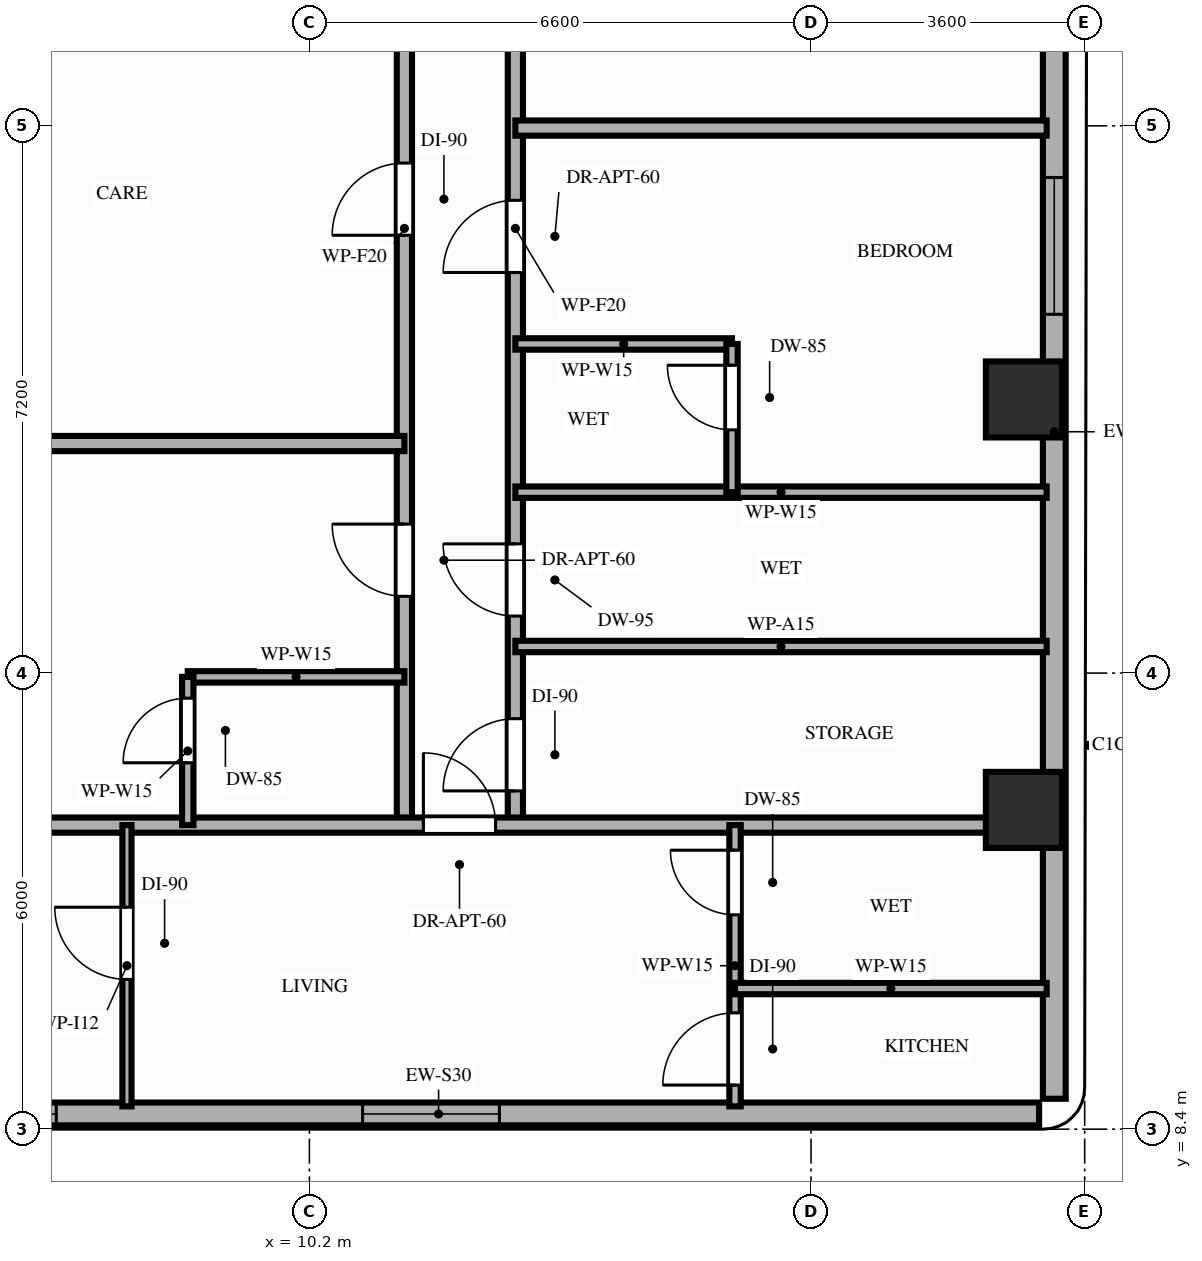
"""IFC4 building model, lengths in metres.
Left out: names, types, materials, properties, quantities, classifications, styles, units other than length and angle.
Written with IfcOpenShell. Run it as: python <this file> out.ifc"""

import sys

from ifc_helpers import new_model, si_unit, direction, frame, frame_2d, origin, origin_2d, place, context, subcontext, project, spatial, rectangle, extrude, element, fill, save


model = new_model("IFC4")
c1 = context("Model", 3, precision=1e-05, world=origin(), true_north=direction((0.0, 1.0)))
c2 = subcontext(c1, "Body", "Model", "MODEL_VIEW")
j1 = project(units=[si_unit("LENGTHUNIT", "METRE"), si_unit("PLANEANGLEUNIT", "RADIAN")], contexts=[c1])
p1 = place(None, origin())
s1 = spatial("IfcSite", under=j1, at=p1, CompositionType="ELEMENT")
p2 = place(p1, origin())
s2 = spatial("IfcBuilding", under=s1, at=p2, CompositionType="ELEMENT")
p3 = place(p2, frame((0.0, 0.0, 133.0)))
s3 = spatial("IfcBuildingStorey", under=s2, at=p3, CompositionType="ELEMENT", Elevation=133.0)
for number, where, z_axis, x_axis in (
    (1, (19.6, 12.6, 0.0), (0.0, 0.0, 1.0), (1.0, 0.0, 0.0)),
    (2, (19.6, 18.0, 0.0), (0.0, 0.0, 1.0), (1.0, 0.0, 0.0)),
):
    element("IfcColumn", number, at=place(p3, frame(where, z_axis=z_axis, x_axis=x_axis)), inside=s3, PredefinedType="COLUMN", context=c2, shape_type="SweptSolid", body=[
        extrude(rectangle(XDim=1.0, YDim=1.0, at=origin_2d()), origin(), (0.0, 0.0, 1.0), 3.2),
    ])
p4 = place(p3, frame((4.0, 8.6, 0.0), z_axis=(0.0, 0.0, 1.0), x_axis=(1.0, 0.0, 0.0)))
e3 = element("IfcWall", 3, at=p4, inside=s3, PredefinedType="STANDARD", context=c2, shape_type="SweptSolid", body=[
    extrude(rectangle(XDim=15.8, YDim=0.3, at=frame_2d((7.9, 0.0))), origin(), (0.0, 0.0, 1.0), 3.02),
])
p5 = place(p4, frame((1.07, 0.0, 0.85)))
e4 = element("IfcOpeningElement", 4, at=p5, cuts=e3, PredefinedType="OPENING", context=c2, shape_type="SweptSolid", body=[
    extrude(rectangle(XDim=1.8, YDim=1.75, at=frame_2d((0.9, 0.875))), frame((0.0, 0.16, 0.0), z_axis=(0.0, -1.0, 0.0), x_axis=(1.0, 0.0, 0.0)), (0.0, 0.0, 1.0), 0.32),
])
p6 = place(p4, frame((6.9, 0.0, 0.85)))
e5 = element("IfcOpeningElement", 5, at=p6, cuts=e3, PredefinedType="OPENING", context=c2, shape_type="SweptSolid", body=[
    extrude(rectangle(XDim=1.8, YDim=1.75, at=frame_2d((0.9, 0.875))), frame((0.0, 0.16, 0.0), z_axis=(0.0, -1.0, 0.0), x_axis=(1.0, 0.0, 0.0)), (0.0, 0.0, 1.0), 0.32),
])
p7 = place(p3, frame((20.0, 8.8, 0.0), z_axis=(0.0, 0.0, 1.0), x_axis=(0.0, 1.0, 0.0)))
e6 = element("IfcWall", 6, at=p7, inside=s3, PredefinedType="STANDARD", context=c2, shape_type="SweptSolid", body=[
    extrude(rectangle(XDim=17.55, YDim=0.3, at=frame_2d((8.775, 0.0))), origin(), (0.0, 0.0, 1.0), 2.46),
])
p8 = place(p7, frame((10.32, 0.0, 0.85)))
e7 = element("IfcOpeningElement", 7, at=p8, cuts=e6, PredefinedType="OPENING", context=c2, shape_type="SweptSolid", body=[
    extrude(rectangle(XDim=1.8, YDim=1.36, at=frame_2d((0.9, 0.68))), frame((0.0, 0.16, 0.0), z_axis=(0.0, -1.0, 0.0), x_axis=(1.0, 0.0, 0.0)), (0.0, 0.0, 1.0), 0.32),
])
p9 = place(p3, frame((11.45, 12.4, 0.0), z_axis=(0.0, 0.0, 1.0), x_axis=(0.0, 1.0, 0.0)))
e8 = element("IfcWall", 8, at=p9, inside=s3, PredefinedType="PARTITIONING", context=c2, shape_type="SweptSolid", body=[
    extrude(rectangle(XDim=15.7, YDim=0.2, at=frame_2d((7.85, 0.0))), origin(), (0.0, 0.0, 1.0), 2.46),
])
p10 = place(p9, frame((3.01, 0.0, 0.0)))
e9 = element("IfcOpeningElement", 9, at=p10, cuts=e8, PredefinedType="OPENING", context=c2, shape_type="SweptSolid", body=[
    extrude(rectangle(XDim=0.95, YDim=2.15, at=frame_2d((0.475, 1.075))), frame((0.0, 0.11, 0.0), z_axis=(0.0, -1.0, 0.0), x_axis=(1.0, 0.0, 0.0)), (0.0, 0.0, 1.0), 0.22),
])
p11 = place(p9, frame((7.76, 0.0, 0.0)))
e10 = element("IfcOpeningElement", 10, at=p11, cuts=e8, PredefinedType="OPENING", context=c2, shape_type="SweptSolid", body=[
    extrude(rectangle(XDim=0.95, YDim=2.15, at=frame_2d((0.475, 1.075))), frame((0.0, 0.11, 0.0), z_axis=(0.0, -1.0, 0.0), x_axis=(1.0, 0.0, 0.0)), (0.0, 0.0, 1.0), 0.22),
])
p12 = place(p9, frame((13.1, 0.0, 0.0)))
e11 = element("IfcOpeningElement", 11, at=p12, cuts=e8, PredefinedType="OPENING", context=c2, shape_type="SweptSolid", body=[
    extrude(rectangle(XDim=0.95, YDim=2.15, at=frame_2d((0.475, 1.075))), frame((0.0, 0.11, 0.0), z_axis=(0.0, -1.0, 0.0), x_axis=(1.0, 0.0, 0.0)), (0.0, 0.0, 1.0), 0.22),
])
p13 = place(p3, frame((12.91, 12.4, 0.0), z_axis=(0.0, 0.0, 1.0), x_axis=(0.0, 1.0, 0.0)))
e12 = element("IfcWall", 12, at=p13, inside=s3, PredefinedType="PARTITIONING", context=c2, shape_type="SweptSolid", body=[
    extrude(rectangle(XDim=15.7, YDim=0.2, at=frame_2d((7.85, 0.0))), origin(), (0.0, 0.0, 1.0), 2.46),
])
p14 = place(p13, frame((0.45, 0.0, 0.0)))
e13 = element("IfcOpeningElement", 13, at=p14, cuts=e12, PredefinedType="OPENING", context=c2, shape_type="SweptSolid", body=[
    extrude(rectangle(XDim=0.95, YDim=2.15, at=frame_2d((0.475, 1.075))), frame((0.0, 0.11, 0.0), z_axis=(0.0, -1.0, 0.0), x_axis=(1.0, 0.0, 0.0)), (0.0, 0.0, 1.0), 0.22),
])
p15 = place(p13, frame((2.75, 0.0, 0.0)))
e14 = element("IfcOpeningElement", 14, at=p15, cuts=e12, PredefinedType="OPENING", context=c2, shape_type="SweptSolid", body=[
    extrude(rectangle(XDim=0.95, YDim=2.1, at=frame_2d((0.475, 1.05))), frame((0.0, 0.11, 0.0), z_axis=(0.0, -1.0, 0.0), x_axis=(1.0, 0.0, 0.0)), (0.0, 0.0, 1.0), 0.22),
])
p16 = place(p13, frame((11.96, 0.0, 0.0)))
e15 = element("IfcOpeningElement", 15, at=p16, cuts=e12, PredefinedType="OPENING", context=c2, shape_type="SweptSolid", body=[
    extrude(rectangle(XDim=0.95, YDim=2.15, at=frame_2d((0.475, 1.075))), frame((0.0, 0.11, 0.0), z_axis=(0.0, -1.0, 0.0), x_axis=(1.0, 0.0, 0.0)), (0.0, 0.0, 1.0), 0.22),
])
p17 = place(p13, frame((7.27, 0.0, 0.0)))
e16 = element("IfcOpeningElement", 16, at=p17, cuts=e12, PredefinedType="OPENING", context=c2, shape_type="SweptSolid", body=[
    extrude(rectangle(XDim=0.95, YDim=2.15, at=frame_2d((0.475, 1.075))), frame((0.0, 0.11, 0.0), z_axis=(0.0, -1.0, 0.0), x_axis=(1.0, 0.0, 0.0)), (0.0, 0.0, 1.0), 0.22),
])
p18 = place(p3, frame((3.9, 12.4, 0.0), z_axis=(0.0, 0.0, 1.0), x_axis=(1.0, 0.0, 0.0)))
e17 = element("IfcWall", 17, at=p18, inside=s3, PredefinedType="PARTITIONING", context=c2, shape_type="SweptSolid", body=[
    extrude(rectangle(XDim=16.0, YDim=0.2, at=frame_2d((8.0, 0.0))), origin(), (0.0, 0.0, 1.0), 2.46),
])
p19 = place(p18, frame((7.8, 0.0, 0.0)))
e18 = element("IfcOpeningElement", 18, at=p19, cuts=e17, PredefinedType="OPENING", context=c2, shape_type="SweptSolid", body=[
    extrude(rectangle(XDim=0.95, YDim=2.15, at=frame_2d((0.475, 1.075))), frame((0.0, 0.11, 0.0), z_axis=(0.0, -1.0, 0.0), x_axis=(1.0, 0.0, 0.0)), (0.0, 0.0, 1.0), 0.22),
])
p20 = place(p3, frame((8.6, 14.35, 0.0), z_axis=(0.0, 0.0, 1.0), x_axis=(1.0, 0.0, 0.0)))
e19 = element("IfcWall", 19, at=p20, inside=s3, PredefinedType="PARTITIONING", context=c2, shape_type="SweptSolid", body=[
    extrude(rectangle(XDim=2.85, YDim=0.15, at=frame_2d((1.425, 0.0))), origin(), (0.0, 0.0, 1.0), 2.71),
])
p21 = place(p3, frame((8.6, 12.4, 0.0), z_axis=(0.0, 0.0, 1.0), x_axis=(0.0, 1.0, 0.0)))
e20 = element("IfcWall", 20, at=p21, inside=s3, PredefinedType="PARTITIONING", context=c2, shape_type="SweptSolid", body=[
    extrude(rectangle(XDim=1.95, YDim=0.15, at=frame_2d((0.975, 0.0))), origin(), (0.0, 0.0, 1.0), 2.46),
])
p22 = place(p21, frame((0.82, 0.0, 0.0)))
e21 = element("IfcOpeningElement", 21, at=p22, cuts=e20, PredefinedType="OPENING", context=c2, shape_type="SweptSolid", body=[
    extrude(rectangle(XDim=0.85, YDim=2.1, at=frame_2d((0.425, 1.05))), frame((0.0, 0.085, 0.0), z_axis=(0.0, -1.0, 0.0), x_axis=(1.0, 0.0, 0.0)), (0.0, 0.0, 1.0), 0.17),
])
p23 = place(p3, frame((3.9, 17.42, 0.0), z_axis=(0.0, 0.0, 1.0), x_axis=(1.0, 0.0, 0.0)))
e22 = element("IfcWall", 22, at=p23, inside=s3, PredefinedType="PARTITIONING", context=c2, shape_type="SweptSolid", body=[
    extrude(rectangle(XDim=7.55, YDim=0.2, at=frame_2d((3.775, 0.0))), origin(), (0.0, 0.0, 1.0), 2.46),
])
p24 = place(p3, frame((7.8, 8.7, 0.0), z_axis=(0.0, 0.0, 1.0), x_axis=(0.0, 1.0, 0.0)))
e23 = element("IfcWall", 23, at=p24, inside=s3, PredefinedType="PARTITIONING", context=c2, shape_type="SweptSolid", body=[
    extrude(rectangle(XDim=3.7, YDim=0.12, at=frame_2d((1.85, 0.0))), origin(), (0.0, 0.0, 1.0), 2.46),
])
p25 = place(p24, frame((1.67, 0.0, 0.0)))
e24 = element("IfcOpeningElement", 24, at=p25, cuts=e23, PredefinedType="OPENING", context=c2, shape_type="SweptSolid", body=[
    extrude(rectangle(XDim=0.95, YDim=2.15, at=frame_2d((0.475, 1.075))), frame((0.0, 0.07, 0.0), z_axis=(0.0, -1.0, 0.0), x_axis=(1.0, 0.0, 0.0)), (0.0, 0.0, 1.0), 0.14),
])
p26 = place(p3, frame((15.8, 8.7, 0.0), z_axis=(0.0, 0.0, 1.0), x_axis=(0.0, 1.0, 0.0)))
e25 = element("IfcWall", 25, at=p26, inside=s3, PredefinedType="PARTITIONING", context=c2, shape_type="SweptSolid", body=[
    extrude(rectangle(XDim=3.7, YDim=0.15, at=frame_2d((1.85, 0.0))), origin(), (0.0, 0.0, 1.0), 2.46),
])
p27 = place(p26, frame((0.28, 0.0, 0.0)))
e26 = element("IfcOpeningElement", 26, at=p27, cuts=e25, PredefinedType="OPENING", context=c2, shape_type="SweptSolid", body=[
    extrude(rectangle(XDim=0.95, YDim=2.15, at=frame_2d((0.475, 1.075))), frame((0.0, 0.085, 0.0), z_axis=(0.0, -1.0, 0.0), x_axis=(1.0, 0.0, 0.0)), (0.0, 0.0, 1.0), 0.17),
])
p28 = place(p26, frame((2.52, 0.0, 0.0)))
e27 = element("IfcOpeningElement", 27, at=p28, cuts=e25, PredefinedType="OPENING", context=c2, shape_type="SweptSolid", body=[
    extrude(rectangle(XDim=0.85, YDim=2.1, at=frame_2d((0.425, 1.05))), frame((0.0, 0.085, 0.0), z_axis=(0.0, -1.0, 0.0), x_axis=(1.0, 0.0, 0.0)), (0.0, 0.0, 1.0), 0.17),
])
p29 = place(p3, frame((15.8, 10.25, 0.0), z_axis=(0.0, 0.0, 1.0), x_axis=(1.0, 0.0, 0.0)))
e28 = element("IfcWall", 28, at=p29, inside=s3, PredefinedType="PARTITIONING", context=c2, shape_type="SweptSolid", body=[
    extrude(rectangle(XDim=4.1, YDim=0.15, at=frame_2d((2.05, 0.0))), origin(), (0.0, 0.0, 1.0), 3.02),
])
for number, where, z_axis, x_axis in (
    (29, (12.91, 14.75, 0.0), (0.0, 0.0, 1.0), (1.0, 0.0, 0.0)),
    (30, (12.91, 16.78, 0.0), (0.0, 0.0, 1.0), (1.0, 0.0, 0.0)),
):
    element("IfcWall", number, at=place(p3, frame(where, z_axis=z_axis, x_axis=x_axis)), inside=s3, PredefinedType="PARTITIONING", context=c2, shape_type="SweptSolid", body=[
        extrude(rectangle(XDim=6.99, YDim=0.15, at=frame_2d((3.495, 0.0))), origin(), (0.0, 0.0, 1.0), 2.46),
    ])
p30 = place(p3, frame((12.91, 21.57, 0.0), z_axis=(0.0, 0.0, 1.0), x_axis=(1.0, 0.0, 0.0)))
e31 = element("IfcWall", 31, at=p30, inside=s3, PredefinedType="PARTITIONING", context=c2, shape_type="SweptSolid", body=[
    extrude(rectangle(XDim=6.99, YDim=0.2, at=frame_2d((3.495, 0.0))), origin(), (0.0, 0.0, 1.0), 2.46),
])
p31 = place(p3, frame((12.91, 18.73, 0.0), z_axis=(0.0, 0.0, 1.0), x_axis=(1.0, 0.0, 0.0)))
e32 = element("IfcWall", 32, at=p31, inside=s3, PredefinedType="PARTITIONING", context=c2, shape_type="SweptSolid", body=[
    extrude(rectangle(XDim=2.85, YDim=0.15, at=frame_2d((1.425, 0.0))), origin(), (0.0, 0.0, 1.0), 3.02),
])
p32 = place(p3, frame((15.76, 16.78, 0.0), z_axis=(0.0, 0.0, 1.0), x_axis=(0.0, 1.0, 0.0)))
e33 = element("IfcWall", 33, at=p32, inside=s3, PredefinedType="PARTITIONING", context=c2, shape_type="SweptSolid", body=[
    extrude(rectangle(XDim=1.95, YDim=0.15, at=frame_2d((0.975, 0.0))), origin(), (0.0, 0.0, 1.0), 2.46),
])
p33 = place(p32, frame((0.82, 0.0, 0.0)))
e34 = element("IfcOpeningElement", 34, at=p33, cuts=e33, PredefinedType="OPENING", context=c2, shape_type="SweptSolid", body=[
    extrude(rectangle(XDim=0.85, YDim=2.1, at=frame_2d((0.425, 1.05))), frame((0.0, 0.085, 0.0), z_axis=(0.0, -1.0, 0.0), x_axis=(1.0, 0.0, 0.0)), (0.0, 0.0, 1.0), 0.17),
])
p34 = place(p5, origin())
e35 = element("IfcWindow", 35, at=p34, inside=s3, PartitioningType="SINGLE_PANEL", PredefinedType="WINDOW", context=c2, shape_type="SweptSolid", body=[
    extrude(rectangle(XDim=1.8, YDim=1.75, at=frame_2d((0.9, 0.875))), frame((0.0, 0.03, 0.0), z_axis=(0.0, -1.0, 0.0), x_axis=(1.0, 0.0, 0.0)), (0.0, 0.0, 1.0), 0.06),
])
fill(e4, e35)
p35 = place(p6, origin())
e36 = element("IfcWindow", 36, at=p35, inside=s3, PartitioningType="SINGLE_PANEL", PredefinedType="WINDOW", context=c2, shape_type="SweptSolid", body=[
    extrude(rectangle(XDim=1.8, YDim=1.75, at=frame_2d((0.9, 0.875))), frame((0.0, 0.03, 0.0), z_axis=(0.0, -1.0, 0.0), x_axis=(1.0, 0.0, 0.0)), (0.0, 0.0, 1.0), 0.06),
])
fill(e5, e36)
p36 = place(p8, origin())
e37 = element("IfcWindow", 37, at=p36, inside=s3, PartitioningType="SINGLE_PANEL", PredefinedType="WINDOW", context=c2, shape_type="SweptSolid", body=[
    extrude(rectangle(XDim=1.8, YDim=1.36, at=frame_2d((0.9, 0.68))), frame((0.0, 0.03, 0.0), z_axis=(0.0, -1.0, 0.0), x_axis=(1.0, 0.0, 0.0)), (0.0, 0.0, 1.0), 0.06),
])
fill(e7, e37)
p37 = place(p22, origin())
e38 = element("IfcDoor", 38, at=p37, inside=s3, OperationType="SINGLE_SWING_LEFT", PredefinedType="DOOR", context=c2, shape_type="SweptSolid", body=[
    extrude(rectangle(XDim=0.85, YDim=2.1, at=frame_2d((0.425, 1.05))), frame((0.0, 0.025, 0.0), z_axis=(0.0, -1.0, 0.0), x_axis=(1.0, 0.0, 0.0)), (0.0, 0.0, 1.0), 0.05),
])
fill(e21, e38)
p38 = place(p10, origin())
e39 = element("IfcDoor", 39, at=p38, inside=s3, OperationType="SINGLE_SWING_RIGHT", PredefinedType="DOOR", context=c2, shape_type="SweptSolid", body=[
    extrude(rectangle(XDim=0.95, YDim=2.15, at=frame_2d((0.475, 1.075))), frame((0.0, 0.025, 0.0), z_axis=(0.0, -1.0, 0.0), x_axis=(1.0, 0.0, 0.0)), (0.0, 0.0, 1.0), 0.05),
])
fill(e9, e39)
p39 = place(p11, origin())
e40 = element("IfcDoor", 40, at=p39, inside=s3, OperationType="SINGLE_SWING_LEFT", PredefinedType="DOOR", context=c2, shape_type="SweptSolid", body=[
    extrude(rectangle(XDim=0.95, YDim=2.15, at=frame_2d((0.475, 1.075))), frame((0.0, 0.025, 0.0), z_axis=(0.0, -1.0, 0.0), x_axis=(1.0, 0.0, 0.0)), (0.0, 0.0, 1.0), 0.05),
])
fill(e10, e40)
p40 = place(p19, origin())
e41 = element("IfcDoor", 41, at=p40, inside=s3, OperationType="SINGLE_SWING_LEFT", PredefinedType="DOOR", context=c2, shape_type="SweptSolid", body=[
    extrude(rectangle(XDim=0.95, YDim=2.15, at=frame_2d((0.475, 1.075))), frame((0.0, 0.025, 0.0), z_axis=(0.0, -1.0, 0.0), x_axis=(1.0, 0.0, 0.0)), (0.0, 0.0, 1.0), 0.05),
])
fill(e18, e41)
p41 = place(p25, origin())
e42 = element("IfcDoor", 42, at=p41, inside=s3, OperationType="SINGLE_SWING_RIGHT", PredefinedType="DOOR", context=c2, shape_type="SweptSolid", body=[
    extrude(rectangle(XDim=0.95, YDim=2.15, at=frame_2d((0.475, 1.075))), frame((0.0, 0.025, 0.0), z_axis=(0.0, -1.0, 0.0), x_axis=(1.0, 0.0, 0.0)), (0.0, 0.0, 1.0), 0.05),
])
fill(e24, e42)
p42 = place(p27, origin())
e43 = element("IfcDoor", 43, at=p42, inside=s3, OperationType="SINGLE_SWING_LEFT", PredefinedType="DOOR", context=c2, shape_type="SweptSolid", body=[
    extrude(rectangle(XDim=0.95, YDim=2.15, at=frame_2d((0.475, 1.075))), frame((0.0, 0.025, 0.0), z_axis=(0.0, -1.0, 0.0), x_axis=(1.0, 0.0, 0.0)), (0.0, 0.0, 1.0), 0.05),
])
fill(e26, e43)
p43 = place(p28, origin())
e44 = element("IfcDoor", 44, at=p43, inside=s3, OperationType="SINGLE_SWING_RIGHT", PredefinedType="DOOR", context=c2, shape_type="SweptSolid", body=[
    extrude(rectangle(XDim=0.85, YDim=2.1, at=frame_2d((0.425, 1.05))), frame((0.0, 0.025, 0.0), z_axis=(0.0, -1.0, 0.0), x_axis=(1.0, 0.0, 0.0)), (0.0, 0.0, 1.0), 0.05),
])
fill(e27, e44)
p44 = place(p14, origin())
e45 = element("IfcDoor", 45, at=p44, inside=s3, OperationType="SINGLE_SWING_LEFT", PredefinedType="DOOR", context=c2, shape_type="SweptSolid", body=[
    extrude(rectangle(XDim=0.95, YDim=2.15, at=frame_2d((0.475, 1.075))), frame((0.0, 0.025, 0.0), z_axis=(0.0, -1.0, 0.0), x_axis=(1.0, 0.0, 0.0)), (0.0, 0.0, 1.0), 0.05),
])
fill(e13, e45)
p45 = place(p15, origin())
e46 = element("IfcDoor", 46, at=p45, inside=s3, OperationType="SINGLE_SWING_RIGHT", PredefinedType="DOOR", context=c2, shape_type="SweptSolid", body=[
    extrude(rectangle(XDim=0.95, YDim=2.1, at=frame_2d((0.475, 1.05))), frame((0.0, 0.025, 0.0), z_axis=(0.0, -1.0, 0.0), x_axis=(1.0, 0.0, 0.0)), (0.0, 0.0, 1.0), 0.05),
])
fill(e14, e46)
p46 = place(p33, origin())
e47 = element("IfcDoor", 47, at=p46, inside=s3, OperationType="SINGLE_SWING_RIGHT", PredefinedType="DOOR", context=c2, shape_type="SweptSolid", body=[
    extrude(rectangle(XDim=0.85, YDim=2.1, at=frame_2d((0.425, 1.05))), frame((0.0, 0.025, 0.0), z_axis=(0.0, -1.0, 0.0), x_axis=(1.0, 0.0, 0.0)), (0.0, 0.0, 1.0), 0.05),
])
fill(e34, e47)
p47 = place(p17, origin())
e48 = element("IfcDoor", 48, at=p47, inside=s3, OperationType="SINGLE_SWING_LEFT", PredefinedType="DOOR", context=c2, shape_type="SweptSolid", body=[
    extrude(rectangle(XDim=0.95, YDim=2.15, at=frame_2d((0.475, 1.075))), frame((0.0, 0.025, 0.0), z_axis=(0.0, -1.0, 0.0), x_axis=(1.0, 0.0, 0.0)), (0.0, 0.0, 1.0), 0.05),
])
fill(e16, e48)
save(model, sys.argv[1])
